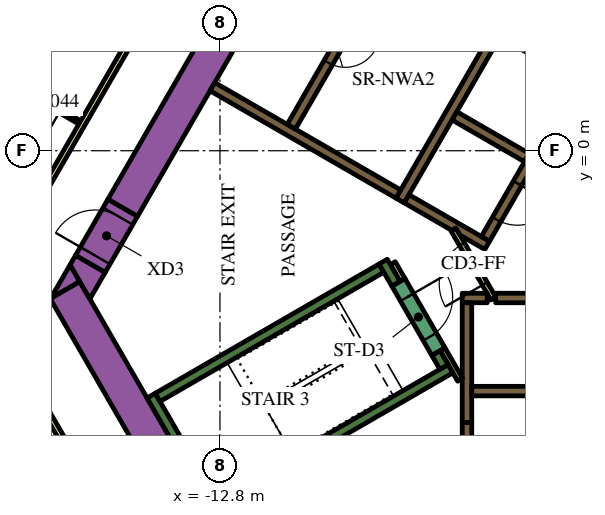
"""IFC4 building model, lengths in metres.
Left out: names, types, materials, properties, quantities, classifications, styles, units other than length and angle.
Written with IfcOpenShell. Run it as: python <this file> out.ifc"""

import sys

from ifc_helpers import new_model, si_unit, direction, frame, frame_2d, origin, place, context, subcontext, project, spatial, polyline, rectangle, outline, extrude, element, fill, save


model = new_model("IFC4")
c1 = context("Model", 3, precision=1e-05, world=origin(), true_north=direction((0.0, 1.0)))
c2 = subcontext(c1, "Body", "Model", "MODEL_VIEW")
j1 = project(units=[si_unit("LENGTHUNIT", "METRE"), si_unit("PLANEANGLEUNIT", "RADIAN")], contexts=[c1])
p1 = place(None, origin())
s1 = spatial("IfcSite", under=j1, at=p1, CompositionType="ELEMENT")
p2 = place(p1, origin())
s2 = spatial("IfcBuilding", under=s1, at=p2, CompositionType="ELEMENT")
p3 = place(p2, frame((0.0, 0.0, 99.3)))
s3 = spatial("IfcBuildingStorey", under=s2, at=p3, CompositionType="ELEMENT", Elevation=99.3)
p4 = place(p3, frame((-15.36, -1.503, 0.0), z_axis=(0.0, 0.0, 1.0), x_axis=(0.50000389221, 0.866023156604, 0.0)))
e1 = element("IfcWall", 1, at=p4, inside=s3, PredefinedType="SOLIDWALL", context=c2, shape_type="SweptSolid", body=[
    extrude(rectangle(XDim=21.0, YDim=0.9, at=frame_2d((10.5, 0.0))), origin(), (0.0, 0.0, 1.0), 3.9),
])
p5 = place(p3, frame((-12.134, -11.883, 0.0), z_axis=(0.0, 0.0, 1.0), x_axis=(-0.500005339912, 0.866022320763, 0.0)))
e2 = element("IfcWall", 2, at=p5, inside=s3, PredefinedType="SOLIDWALL", context=c2, shape_type="SweptSolid", body=[
    extrude(rectangle(XDim=9.488, YDim=0.9, at=frame_2d((4.744, 0.0))), origin(), (0.0, 0.0, 1.0), 3.9),
])
p6 = place(p3, origin())
e3 = element("IfcWall", 3, at=p6, inside=s3, PredefinedType="SOLIDWALL", context=c2, shape_type="SweptSolid", body=[
    extrude(outline(polyline([(-16.489, -3.44), (-17.251, -3.88), (-16.743, -3.0), (-16.489, -3.44)])), origin(), (0.0, 0.0, 1.0), 3.9),
])
e4 = element("IfcWall", 4, at=p6, inside=s3, PredefinedType="SOLIDWALL", context=c2, shape_type="SweptSolid", body=[
    extrude(outline(polyline([(-15.82, -3.201), (-16.223, -3.9), (-16.743, -3.0), (-16.599, -2.751), (-15.82, -3.201)])), origin(), (0.0, 0.0, 1.0), 3.9),
])
p7 = place(p3, frame((-12.885, -9.431, 0.0), z_axis=(0.0, 0.0, 1.0), x_axis=(-0.500020560727, 0.866013532718, 0.0)))
e5 = element("IfcWall", 5, at=p7, inside=s3, PredefinedType="SOLIDWALL", context=c2, shape_type="SweptSolid", body=[
    extrude(rectangle(XDim=3.45, YDim=0.25, at=frame_2d((1.725, 0.0))), origin(), (0.0, 0.0, 1.0), 3.9),
])
p8 = place(p3, frame((-14.44, -6.49, 0.0), z_axis=(0.0, 0.0, 1.0), x_axis=(0.866022966069, 0.500004222222, 0.0)))
e6 = element("IfcWall", 6, at=p8, inside=s3, PredefinedType="SOLIDWALL", context=c2, shape_type="SweptSolid", body=[
    extrude(rectangle(XDim=6.8, YDim=0.25, at=frame_2d((3.4, 0.0))), origin(), (0.0, 0.0, 1.0), 3.9),
])
p9 = place(p3, frame((-8.168, -3.503, 0.0), z_axis=(0.0, 0.0, 1.0), x_axis=(-0.499952099219, 0.866053057547, 0.0)))
e7 = element("IfcWall", 7, at=p9, inside=s3, PredefinedType="SOLIDWALL", context=c2, shape_type="SweptSolid", body=[
    extrude(rectangle(XDim=0.675, YDim=0.25, at=frame_2d((0.337, 0.0))), origin(), (0.0, 0.0, 1.0), 3.9),
])
p10 = place(p3, frame((-12.84, -9.261, 0.0), z_axis=(0.0, 0.0, 1.0), x_axis=(0.866016039709, 0.500016218704, 0.0)))
e8 = element("IfcWall", 8, at=p10, inside=s3, PredefinedType="SOLIDWALL", context=c2, shape_type="SweptSolid", body=[
    extrude(rectangle(XDim=7.05, YDim=0.25, at=frame_2d((3.525, 0.0))), origin(), (0.0, 0.0, 1.0), 3.9),
])
p11 = place(p3, frame((-6.905, -5.69, 0.0), z_axis=(0.0, 0.0, 1.0), x_axis=(-0.500402024738, 0.865793170242, 0.0)))
e9 = element("IfcWall", 9, at=p11, inside=s3, PredefinedType="SOLIDWALL", context=c2, shape_type="SweptSolid", body=[
    extrude(rectangle(XDim=0.425, YDim=0.25, at=frame_2d((0.212, 0.0))), origin(), (0.0, 0.0, 1.0), 3.9),
])
p12 = place(p3, frame((-5.545, -3.875, 0.0), z_axis=(0.0, 0.0, 1.0), x_axis=(1.0, 0.0, 0.0)))
e10 = element("IfcWall", 10, at=p12, inside=s3, PredefinedType="SOLIDWALL", context=c2, shape_type="SweptSolid", body=[
    extrude(rectangle(XDim=11.97, YDim=0.25, at=frame_2d((5.985, 0.0))), origin(), (0.0, 0.0, 1.0), 3.9),
])
p13 = place(p3, frame((-6.425, -3.875, 0.0), z_axis=(0.0, 0.0, 1.0), x_axis=(1.0, 0.0, 0.0)))
e11 = element("IfcWall", 11, at=p13, inside=s3, PredefinedType="SOLIDWALL", context=c2, shape_type="SweptSolid", body=[
    extrude(rectangle(XDim=0.658, YDim=0.25, at=frame_2d((0.329, 0.0))), origin(), (0.0, 0.0, 1.0), 3.9),
])
p14 = place(p3, frame((-6.3, -4.0, 0.0), z_axis=(0.0, 0.0, 1.0), x_axis=(0.0, -1.0, 0.0)))
e12 = element("IfcWall", 12, at=p14, inside=s3, PredefinedType="SOLIDWALL", context=c2, shape_type="SweptSolid", body=[
    extrude(rectangle(XDim=3.154, YDim=0.25, at=frame_2d((1.577, 0.0))), origin(), (0.0, 0.0, 1.0), 3.9),
])
p15 = place(p3, frame((-8.06, -1.311, 0.0), z_axis=(0.0, 0.0, 1.0), x_axis=(0.50000273126, 0.866023826885, 0.0)))
e13 = element("IfcWall", 13, at=p15, inside=s3, PredefinedType="SOLIDWALL", context=c2, shape_type="SweptSolid", body=[
    extrude(rectangle(XDim=10.33, YDim=0.25, at=frame_2d((5.165, 0.0))), origin(), (0.0, 0.0, 1.0), 3.9),
])
for number, where, z_axis, x_axis in (
    (14, (-5.369, 3.1, 0.0), (0.0, 0.0, 1.0), (0.866, -0.5, 0.0)),
    (15, (-4.724, -0.182, 0.0), (0.0, 0.0, 1.0), (-0.866, 0.5, 0.0)),
):
    element("IfcWall", number, at=place(p3, frame(where, z_axis=z_axis, x_axis=x_axis)), inside=s3, PredefinedType="SOLIDWALL", context=c2, shape_type="SweptSolid", body=[
        extrude(rectangle(XDim=2.2, YDim=0.25, at=frame_2d((1.1, 0.0))), origin(), (0.0, 0.0, 1.0), 3.9),
    ])
e16 = element("IfcWall", 16, at=p6, inside=s3, PredefinedType="SOLIDWALL", context=c2, shape_type="SweptSolid", body=[
    extrude(outline(polyline([(-5.922, -2.257), (-5.922, -2.257), (-5.705, -2.382), (-5.83, -2.598), (-6.483, -2.221), (-6.591, -2.033), (-6.591, -2.033), (-6.7, -2.096), (-7.952, -1.373), (-7.827, -1.156), (-5.922, -2.257)])), origin(), (0.0, 0.0, 1.0), 3.9),
])
p16 = place(p3, frame((-8.106, -1.14, 0.0), z_axis=(0.0, 0.0, 1.0), x_axis=(-0.866000643155, 0.500042884217, 0.0)))
e17 = element("IfcWall", 17, at=p16, inside=s3, PredefinedType="SOLIDWALL", context=c2, shape_type="SweptSolid", body=[
    extrude(rectangle(XDim=5.65, YDim=0.25, at=frame_2d((2.825, 0.0))), origin(), (0.0, 0.0, 1.0), 3.9),
])
p17 = place(p3, frame((-6.48, -6.027, 0.0), z_axis=(0.0, 0.0, 1.0), x_axis=(-0.499927229454, 0.866067413802, 0.0)))
e18 = element("IfcWall", 18, at=p17, inside=s3, PredefinedType="PARTITIONING", context=c2, shape_type="SweptSolid", body=[
    extrude(rectangle(XDim=0.929, YDim=0.15, at=frame_2d((0.464, 0.0))), origin(), (0.0, 0.0, 1.0), 3.9),
])
p18 = place(p3, frame((-8.252, -2.958, 0.0), z_axis=(0.0, 0.0, 1.0), x_axis=(0.500174715838, -0.865924508047, 0.0)))
e19 = element("IfcWall", 19, at=p18, inside=s3, PredefinedType="PARTITIONING", context=c2, shape_type="SweptSolid", body=[
    extrude(rectangle(XDim=0.514, YDim=0.15, at=frame_2d((0.257, 0.0))), origin(), (0.0, 0.0, 1.0), 2.75),
])
p19 = place(p3, frame((-6.175, -6.325, 0.0), z_axis=(0.0, 0.0, 1.0), x_axis=(1.0, 0.0, 0.0)))
e20 = element("IfcWall", 20, at=p19, inside=s3, PredefinedType="SOLIDWALL", context=c2, shape_type="SweptSolid", body=[
    extrude(rectangle(XDim=12.35, YDim=0.25, at=frame_2d((6.175, 0.0))), origin(), (0.0, 0.0, 1.0), 3.9),
])
p20 = place(p19, frame((3.205, 0.0, 0.0)))
e21 = element("IfcOpeningElement", 21, at=p20, cuts=e20, PredefinedType="OPENING", context=c2, shape_type="SweptSolid", body=[
    extrude(rectangle(XDim=0.9, YDim=2.1, at=frame_2d((0.45, 1.05))), frame((0.0, 0.135, 0.0), z_axis=(0.0, -1.0, 0.0), x_axis=(1.0, 0.0, 0.0)), (0.0, 0.0, 1.0), 0.27),
])
p21 = place(p19, frame((8.145, 0.0, 0.0)))
e22 = element("IfcOpeningElement", 22, at=p21, cuts=e20, PredefinedType="OPENING", context=c2, shape_type="SweptSolid", body=[
    extrude(rectangle(XDim=1.1, YDim=2.1, at=frame_2d((0.55, 1.05))), frame((0.0, 0.135, 0.0), z_axis=(0.0, -1.0, 0.0), x_axis=(1.0, 0.0, 0.0)), (0.0, 0.0, 1.0), 0.27),
])
p22 = place(p19, frame((10.665, 0.0, 0.0)))
e23 = element("IfcOpeningElement", 23, at=p22, cuts=e20, PredefinedType="OPENING", context=c2, shape_type="SweptSolid", body=[
    extrude(rectangle(XDim=1.1, YDim=2.1, at=frame_2d((0.55, 1.05))), frame((0.0, 0.135, 0.0), z_axis=(0.0, -1.0, 0.0), x_axis=(1.0, 0.0, 0.0)), (0.0, 0.0, 1.0), 0.27),
])
p23 = place(p3, frame((-6.008, 9.144, 0.0), z_axis=(0.0, 0.0, 1.0), x_axis=(-0.500006956611, -0.866021387346, 0.0)))
e24 = element("IfcWall", 24, at=p23, inside=s3, PredefinedType="SOLIDWALL", context=c2, shape_type="SweptSolid", body=[
    extrude(rectangle(XDim=9.83, YDim=0.25, at=frame_2d((4.915, 0.0))), origin(), (0.0, 0.0, 1.0), 3.9),
])
p24 = place(p23, frame((6.985, 0.0, 0.0)))
e25 = element("IfcOpeningElement", 25, at=p24, cuts=e24, PredefinedType="OPENING", context=c2, shape_type="SweptSolid", body=[
    extrude(rectangle(XDim=0.9, YDim=2.1, at=frame_2d((0.45, 1.05))), frame((0.0, 0.135, 0.0), z_axis=(0.0, -1.0, 0.0), x_axis=(1.0, 0.0, 0.0)), (0.0, 0.0, 1.0), 0.27),
])
p25 = place(p3, frame((-0.898, 6.194, 0.0), z_axis=(0.0, 0.0, 1.0), x_axis=(-0.499996202215, -0.866027596426, 0.0)))
e26 = element("IfcWall", 26, at=p25, inside=s3, PredefinedType="SOLIDWALL", context=c2, shape_type="SweptSolid", body=[
    extrude(rectangle(XDim=9.83, YDim=0.25, at=frame_2d((4.915, 0.0))), origin(), (0.0, 0.0, 1.0), 3.9),
])
p26 = place(p25, frame((0.585, 0.0, 0.0)))
e27 = element("IfcOpeningElement", 27, at=p26, cuts=e26, PredefinedType="OPENING", context=c2, shape_type="SweptSolid", body=[
    extrude(rectangle(XDim=1.1, YDim=2.1, at=frame_2d((0.55, 1.05))), frame((0.0, 0.135, 0.0), z_axis=(0.0, -1.0, 0.0), x_axis=(1.0, 0.0, 0.0)), (0.0, 0.0, 1.0), 0.27),
])
p27 = place(p25, frame((3.105, 0.0, 0.0)))
e28 = element("IfcOpeningElement", 28, at=p27, cuts=e26, PredefinedType="OPENING", context=c2, shape_type="SweptSolid", body=[
    extrude(rectangle(XDim=1.1, YDim=2.1, at=frame_2d((0.55, 1.05))), frame((0.0, 0.135, 0.0), z_axis=(0.0, -1.0, 0.0), x_axis=(1.0, 0.0, 0.0)), (0.0, 0.0, 1.0), 0.27),
])
p28 = place(p25, frame((5.625, 0.0, 0.0)))
e29 = element("IfcOpeningElement", 29, at=p28, cuts=e26, PredefinedType="OPENING", context=c2, shape_type="SweptSolid", body=[
    extrude(rectangle(XDim=1.1, YDim=2.1, at=frame_2d((0.55, 1.05))), frame((0.0, 0.135, 0.0), z_axis=(0.0, -1.0, 0.0), x_axis=(1.0, 0.0, 0.0)), (0.0, 0.0, 1.0), 0.27),
])
p29 = place(p25, frame((8.145, 0.0, 0.0)))
e30 = element("IfcOpeningElement", 30, at=p29, cuts=e26, PredefinedType="OPENING", context=c2, shape_type="SweptSolid", body=[
    extrude(rectangle(XDim=1.1, YDim=2.1, at=frame_2d((0.55, 1.05))), frame((0.0, 0.135, 0.0), z_axis=(0.0, -1.0, 0.0), x_axis=(1.0, 0.0, 0.0)), (0.0, 0.0, 1.0), 0.27),
])
p30 = place(p3, frame((-8.103, -3.466, 0.0), z_axis=(0.0, 0.0, 1.0), x_axis=(0.500078061341, -0.865980330357, 0.0)))
e31 = element("IfcWall", 31, at=p30, inside=s3, PredefinedType="SOLIDWALL", context=c2, shape_type="SweptSolid", body=[
    extrude(rectangle(XDim=2.1, YDim=0.4, at=frame_2d((1.05, 0.0))), origin(), (0.0, 0.0, 1.0), 3.9),
])
p31 = place(p30, frame((0.45, 0.0, 0.0)))
e32 = element("IfcOpeningElement", 32, at=p31, cuts=e31, PredefinedType="OPENING", context=c2, shape_type="SweptSolid", body=[
    extrude(rectangle(XDim=1.2, YDim=2.1, at=frame_2d((0.6, 1.05))), frame((0.0, 0.21, 0.0), z_axis=(0.0, -1.0, 0.0), x_axis=(1.0, 0.0, 0.0)), (0.0, 0.0, 1.0), 0.42),
])
p32 = place(p3, frame((-6.3, -7.154, 0.0), z_axis=(0.0, 0.0, 1.0), x_axis=(0.0, -1.0, 0.0)))
e33 = element("IfcWall", 33, at=p32, inside=s3, PredefinedType="SOLIDWALL", context=c2, shape_type="SweptSolid", body=[
    extrude(rectangle(XDim=1.8, YDim=0.25, at=frame_2d((0.9, 0.0))), origin(), (0.0, 0.0, 1.0), 3.9),
])
p33 = place(p32, frame((0.45, 0.0, 0.0)))
e34 = element("IfcOpeningElement", 34, at=p33, cuts=e33, PredefinedType="OPENING", context=c2, shape_type="SweptSolid", body=[
    extrude(rectangle(XDim=0.9, YDim=2.1, at=frame_2d((0.45, 1.05))), frame((0.0, 0.135, 0.0), z_axis=(0.0, -1.0, 0.0), x_axis=(1.0, 0.0, 0.0)), (0.0, 0.0, 1.0), 0.27),
])
p34 = place(p3, frame((-5.606, -3.89, 0.0), z_axis=(0.0, 0.0, 1.0), x_axis=(-0.500027713859, 0.866009402589, 0.0)))
e35 = element("IfcWall", 35, at=p34, inside=s3, PredefinedType="PARTITIONING", context=c2, shape_type="SweptSolid", body=[
    extrude(rectangle(XDim=2.1, YDim=0.15, at=frame_2d((1.05, 0.0))), origin(), (0.0, 0.0, 1.0), 2.75),
])
p35 = place(p34, frame((0.45, 0.0, 0.0)))
e36 = element("IfcOpeningElement", 36, at=p35, cuts=e35, PredefinedType="OPENING", context=c2, shape_type="SweptSolid", body=[
    extrude(rectangle(XDim=1.2, YDim=2.1, at=frame_2d((0.6, 1.05))), frame((0.0, 0.085, 0.0), z_axis=(0.0, -1.0, 0.0), x_axis=(1.0, 0.0, 0.0)), (0.0, 0.0, 1.0), 0.17),
])
p36 = place(p3, frame((-16.209, -2.976, 0.0), z_axis=(0.0, 0.0, 1.0), x_axis=(0.499954529098, 0.86605165483, 0.0)))
e37 = element("IfcWall", 37, at=p36, inside=s3, PredefinedType="SOLIDWALL", context=c2, shape_type="SweptSolid", body=[
    extrude(rectangle(XDim=1.7, YDim=0.9, at=frame_2d((0.85, 0.0))), origin(), (0.0, 0.0, 1.0), 3.9),
])
p37 = place(p36, frame((0.25, 0.0, 0.0)))
e38 = element("IfcOpeningElement", 38, at=p37, cuts=e37, PredefinedType="OPENING", context=c2, shape_type="SweptSolid", body=[
    extrude(rectangle(XDim=1.2, YDim=2.1, at=frame_2d((0.6, 1.05))), frame((0.0, 0.46, 0.0), z_axis=(0.0, -1.0, 0.0), x_axis=(1.0, 0.0, 0.0)), (0.0, 0.0, 1.0), 0.92),
])
p38 = place(p3, frame((-19.081, -3.9, 0.0), z_axis=(0.0, 0.0, 1.0), x_axis=(0.499998313975, 0.866026377209, 0.0)))
e39 = element("IfcWall", 39, at=p38, inside=s3, PredefinedType="PARTITIONING", context=c2, shape_type="SweptSolid", body=[
    extrude(rectangle(XDim=25.766, YDim=0.15, at=frame_2d((12.883, 0.0))), origin(), (0.0, 0.0, 1.0), 2.75),
])
p39 = place(p38, frame((19.306, 0.0, 0.0)))
e40 = element("IfcOpeningElement", 40, at=p39, cuts=e39, PredefinedType="OPENING", context=c2, shape_type="SweptSolid", body=[
    extrude(rectangle(XDim=1.0, YDim=2.1, at=frame_2d((0.5, 1.05))), frame((0.0, 0.085, 0.0), z_axis=(0.0, -1.0, 0.0), x_axis=(1.0, 0.0, 0.0)), (0.0, 0.0, 1.0), 0.17),
])
p40 = place(p38, frame((17.144, 0.0, 0.0)))
e41 = element("IfcOpeningElement", 41, at=p40, cuts=e39, PredefinedType="OPENING", context=c2, shape_type="SweptSolid", body=[
    extrude(rectangle(XDim=0.9, YDim=2.1, at=frame_2d((0.45, 1.05))), frame((0.0, 0.085, 0.0), z_axis=(0.0, -1.0, 0.0), x_axis=(1.0, 0.0, 0.0)), (0.0, 0.0, 1.0), 0.17),
])
p41 = place(p38, frame((9.955, 0.0, 0.0)))
e42 = element("IfcOpeningElement", 42, at=p41, cuts=e39, PredefinedType="OPENING", context=c2, shape_type="SweptSolid", body=[
    extrude(rectangle(XDim=1.1, YDim=2.1, at=frame_2d((0.55, 1.05))), frame((0.0, 0.085, 0.0), z_axis=(0.0, -1.0, 0.0), x_axis=(1.0, 0.0, 0.0)), (0.0, 0.0, 1.0), 0.17),
])
p42 = place(p38, frame((8.648, 0.0, 0.0)))
e43 = element("IfcOpeningElement", 43, at=p42, cuts=e39, PredefinedType="OPENING", context=c2, shape_type="SweptSolid", body=[
    extrude(rectangle(XDim=1.0, YDim=2.1, at=frame_2d((0.5, 1.05))), frame((0.0, 0.085, 0.0), z_axis=(0.0, -1.0, 0.0), x_axis=(1.0, 0.0, 0.0)), (0.0, 0.0, 1.0), 0.17),
])
p43 = place(p38, frame((1.553, 0.0, 0.0)))
e44 = element("IfcOpeningElement", 44, at=p43, cuts=e39, PredefinedType="OPENING", context=c2, shape_type="SweptSolid", body=[
    extrude(rectangle(XDim=0.9, YDim=2.1, at=frame_2d((0.45, 1.05))), frame((0.0, 0.085, 0.0), z_axis=(0.0, -1.0, 0.0), x_axis=(1.0, 0.0, 0.0)), (0.0, 0.0, 1.0), 0.17),
])
p44 = place(p3, frame((-16.412, -8.523, 0.0), z_axis=(0.0, 0.0, 1.0), x_axis=(-0.500001929737, 0.866024289647, 0.0)))
e45 = element("IfcWall", 45, at=p44, inside=s3, PredefinedType="PARTITIONING", context=c2, shape_type="SweptSolid", body=[
    extrude(rectangle(XDim=5.268, YDim=0.15, at=frame_2d((2.634, 0.0))), origin(), (0.0, 0.0, 1.0), 2.75),
])
p45 = place(p44, frame((4.088, 0.0, 0.0)))
e46 = element("IfcOpeningElement", 46, at=p45, cuts=e45, PredefinedType="OPENING", context=c2, shape_type="SweptSolid", body=[
    extrude(rectangle(XDim=1.0, YDim=2.1, at=frame_2d((0.5, 1.05))), frame((0.0, 0.085, 0.0), z_axis=(0.0, -1.0, 0.0), x_axis=(1.0, 0.0, 0.0)), (0.0, 0.0, 1.0), 0.17),
])
p46 = place(p3, frame((-16.487, 0.743, 0.0), z_axis=(0.0, 0.0, 1.0), x_axis=(-0.866021400173, 0.500006934395, 0.0)))
e47 = element("IfcWall", 47, at=p46, inside=s3, PredefinedType="PARTITIONING", context=c2, shape_type="SweptSolid", body=[
    extrude(rectangle(XDim=2.6, YDim=0.1, at=frame_2d((1.3, 0.0))), origin(), (0.0, 0.0, 1.0), 2.75),
])
p47 = place(p46, frame((0.6, 0.0, 0.0)))
e48 = element("IfcOpeningElement", 48, at=p47, cuts=e47, PredefinedType="OPENING", context=c2, shape_type="SweptSolid", body=[
    extrude(rectangle(XDim=0.9, YDim=2.1, at=frame_2d((0.45, 1.05))), frame((0.0, 0.06, 0.0), z_axis=(0.0, -1.0, 0.0), x_axis=(1.0, 0.0, 0.0)), (0.0, 0.0, 1.0), 0.12),
])
p48 = place(p24, origin())
e49 = element("IfcDoor", 49, at=p48, inside=s3, OperationType="SINGLE_SWING_LEFT", PredefinedType="DOOR", context=c2, shape_type="SweptSolid", body=[
    extrude(rectangle(XDim=0.9, YDim=2.1, at=frame_2d((0.45, 1.05))), frame((0.0, 0.025, 0.0), z_axis=(0.0, -1.0, 0.0), x_axis=(1.0, 0.0, 0.0)), (0.0, 0.0, 1.0), 0.05),
])
fill(e25, e49)
p49 = place(p29, origin())
e50 = element("IfcDoor", 50, at=p49, inside=s3, OperationType="DOUBLE_DOOR_SLIDING", PredefinedType="DOOR", context=c2, shape_type="SweptSolid", body=[
    extrude(rectangle(XDim=1.1, YDim=2.1, at=frame_2d((0.55, 1.05))), frame((0.0, 0.025, 0.0), z_axis=(0.0, -1.0, 0.0), x_axis=(1.0, 0.0, 0.0)), (0.0, 0.0, 1.0), 0.05),
])
fill(e30, e50)
p50 = place(p31, origin())
e51 = element("IfcDoor", 51, at=p50, inside=s3, OperationType="SINGLE_SWING_LEFT", PredefinedType="DOOR", context=c2, shape_type="SweptSolid", body=[
    extrude(rectangle(XDim=1.2, YDim=2.1, at=frame_2d((0.6, 1.05))), frame((0.0, 0.025, 0.0), z_axis=(0.0, -1.0, 0.0), x_axis=(1.0, 0.0, 0.0)), (0.0, 0.0, 1.0), 0.05),
])
fill(e32, e51)
p51 = place(p35, origin())
e52 = element("IfcDoor", 52, at=p51, inside=s3, OperationType="SINGLE_SWING_LEFT", PredefinedType="DOOR", context=c2, shape_type="SweptSolid", body=[
    extrude(rectangle(XDim=1.2, YDim=2.1, at=frame_2d((0.6, 1.05))), frame((0.0, 0.025, 0.0), z_axis=(0.0, -1.0, 0.0), x_axis=(1.0, 0.0, 0.0)), (0.0, 0.0, 1.0), 0.05),
])
fill(e36, e52)
p52 = place(p37, origin())
e53 = element("IfcDoor", 53, at=p52, inside=s3, OperationType="SINGLE_SWING_LEFT", PredefinedType="DOOR", context=c2, shape_type="SweptSolid", body=[
    extrude(rectangle(XDim=1.2, YDim=2.1, at=frame_2d((0.6, 1.05))), frame((0.0, 0.025, 0.0), z_axis=(0.0, -1.0, 0.0), x_axis=(1.0, 0.0, 0.0)), (0.0, 0.0, 1.0), 0.05),
])
fill(e38, e53)
p53 = place(p47, origin())
e54 = element("IfcDoor", 54, at=p53, inside=s3, OperationType="SINGLE_SWING_LEFT", PredefinedType="DOOR", context=c2, shape_type="SweptSolid", body=[
    extrude(rectangle(XDim=0.9, YDim=2.1, at=frame_2d((0.45, 1.05))), frame((0.0, 0.025, 0.0), z_axis=(0.0, -1.0, 0.0), x_axis=(1.0, 0.0, 0.0)), (0.0, 0.0, 1.0), 0.05),
])
fill(e48, e54)
save(model, sys.argv[1])
